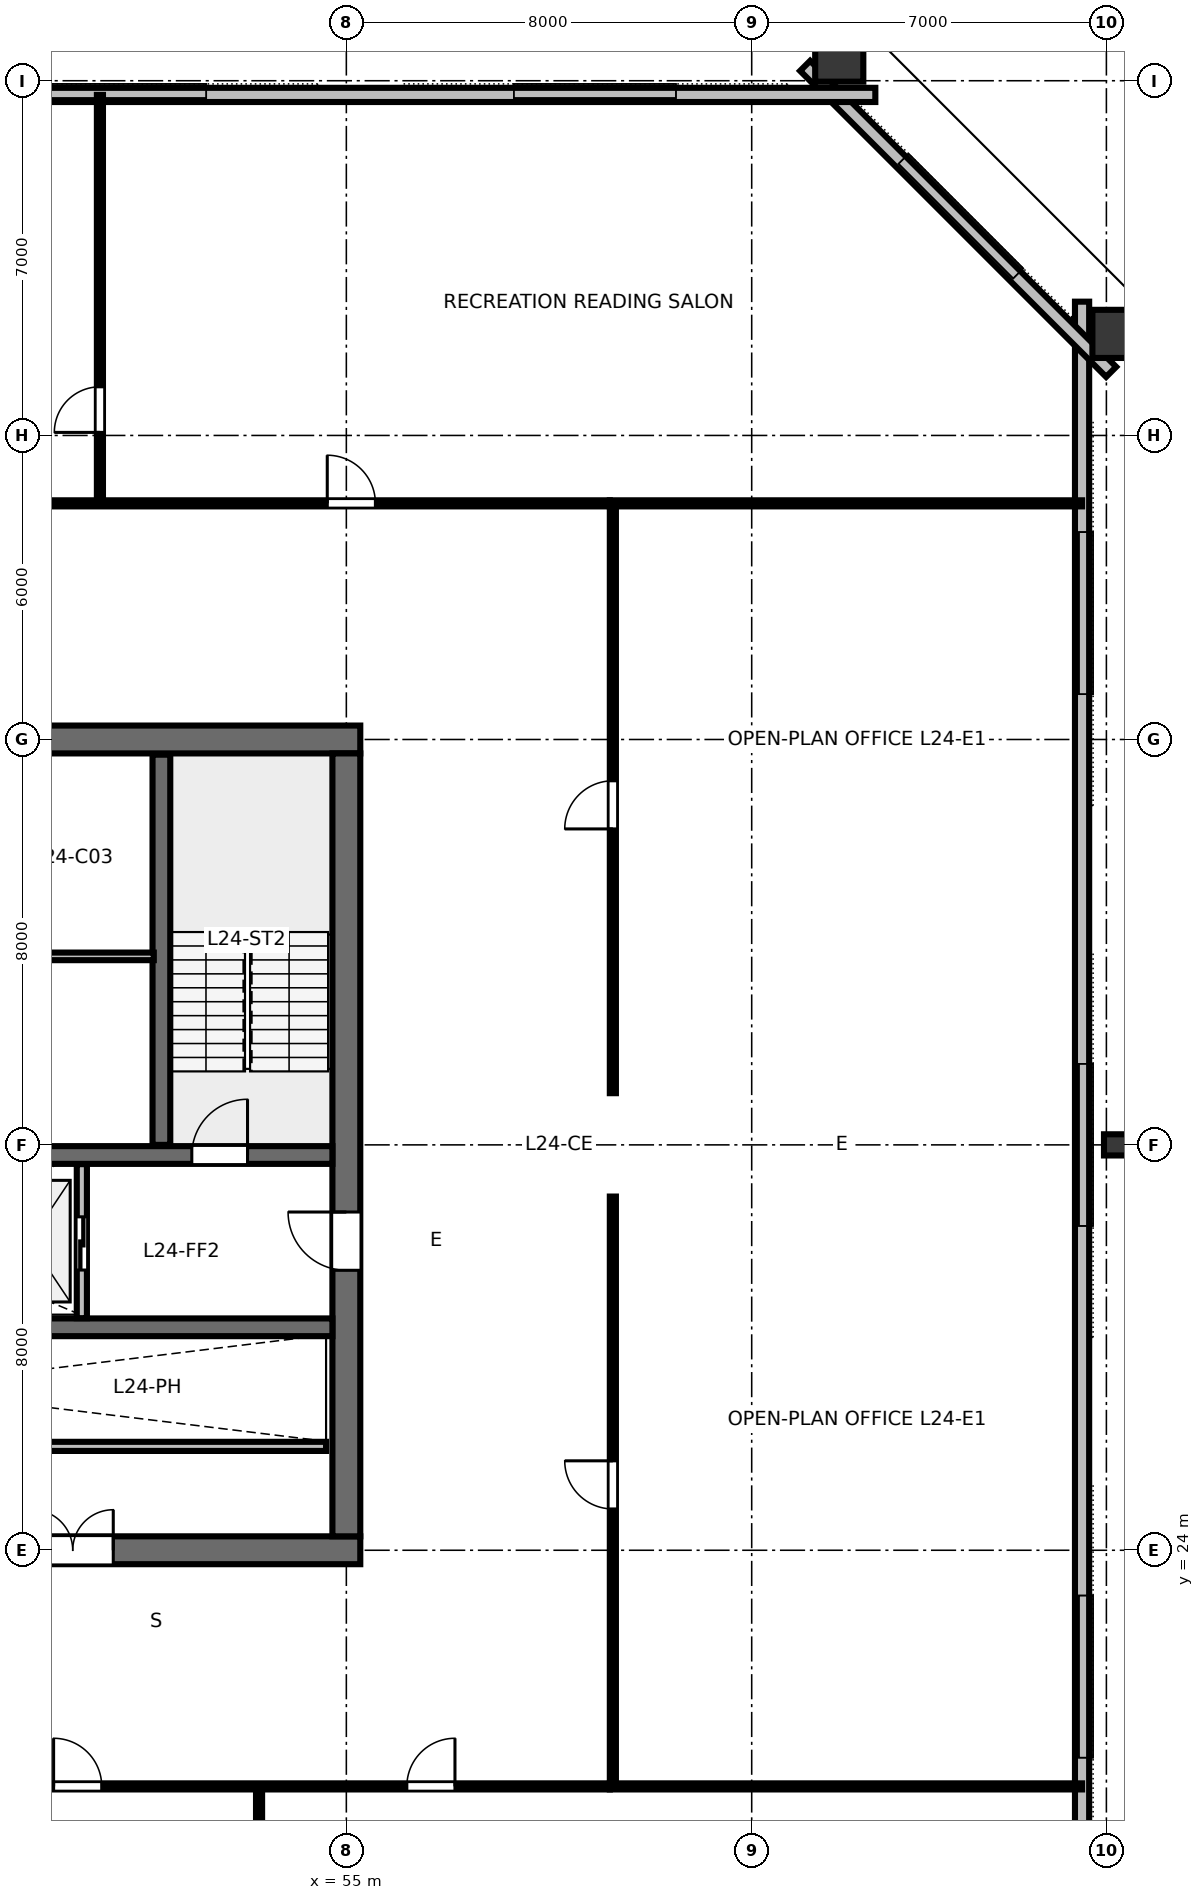
"""IFC4 building model, lengths in metres.
Left out: names, types, materials, properties, quantities, classifications, styles, units other than length and angle.
Written with IfcOpenShell. Run it as: python <this file> out.ifc"""

import sys

from ifc_helpers import new_model, si_unit, direction, frame, frame_2d, origin, origin_2d, place, context, subcontext, project, spatial, rectangle, hollow_rectangle, i_section, extrude, element, fill, save


model = new_model("IFC4")
c1 = context("Model", 3, precision=1e-05, world=origin(), true_north=direction((0.0, 1.0)))
c2 = subcontext(c1, "Body", "Model", "MODEL_VIEW")
j1 = project(units=[si_unit("LENGTHUNIT", "METRE"), si_unit("PLANEANGLEUNIT", "RADIAN")], contexts=[c1])
p1 = place(None, origin())
s1 = spatial("IfcSite", under=j1, at=p1, CompositionType="ELEMENT")
p2 = place(p1, origin())
s2 = spatial("IfcBuilding", under=s1, at=p2, CompositionType="ELEMENT")
p3 = place(p2, frame((0.0, 0.0, 95.2)))
s3 = spatial("IfcBuildingStorey", under=s2, at=p3, CompositionType="ELEMENT", Elevation=95.2)
p4 = place(p3, frame((36.725, 24.0, 0.0), z_axis=(0.0, 0.0, 1.0), x_axis=(1.0, 0.0, 0.0)))
e1 = element("IfcWall", 1, at=p4, inside=s3, PredefinedType="SHEAR", context=c2, shape_type="SweptSolid", body=[
    extrude(rectangle(XDim=18.55, YDim=0.55, at=frame_2d((9.275, 0.0))), origin(), (0.0, 0.0, 1.0), 3.36),
])
p5 = place(p4, frame((5.675, 0.0, 0.0)))
e2 = element("IfcOpeningElement", 2, at=p5, cuts=e1, PredefinedType="OPENING", context=c2, shape_type="SweptSolid", body=[
    extrude(rectangle(XDim=1.6, YDim=2.15, at=frame_2d((0.8, 1.075))), frame((0.0, 0.285, 0.0), z_axis=(0.0, -1.0, 0.0), x_axis=(1.0, 0.0, 0.0)), (0.0, 0.0, 1.0), 0.57),
])
p6 = place(p4, frame((12.075, 0.0, 0.0)))
e3 = element("IfcOpeningElement", 3, at=p6, cuts=e1, PredefinedType="OPENING", context=c2, shape_type="SweptSolid", body=[
    extrude(rectangle(XDim=1.6, YDim=2.15, at=frame_2d((0.8, 1.075))), frame((0.0, 0.285, 0.0), z_axis=(0.0, -1.0, 0.0), x_axis=(1.0, 0.0, 0.0)), (0.0, 0.0, 1.0), 0.57),
])
p7 = place(p3, frame((36.725, 40.0, 0.0), z_axis=(0.0, 0.0, 1.0), x_axis=(1.0, 0.0, 0.0)))
e4 = element("IfcWall", 4, at=p7, inside=s3, PredefinedType="SHEAR", context=c2, shape_type="SweptSolid", body=[
    extrude(rectangle(XDim=18.55, YDim=0.55, at=frame_2d((9.275, 0.0))), origin(), (0.0, 0.0, 1.0), 3.36),
])
p8 = place(p7, frame((8.775, 0.0, 0.0)))
e5 = element("IfcOpeningElement", 5, at=p8, cuts=e4, PredefinedType="OPENING", context=c2, shape_type="SweptSolid", body=[
    extrude(rectangle(XDim=1.0, YDim=2.15, at=frame_2d((0.5, 1.075))), frame((0.0, 0.285, 0.0), z_axis=(0.0, -1.0, 0.0), x_axis=(1.0, 0.0, 0.0)), (0.0, 0.0, 1.0), 0.57),
])
p9 = place(p3, frame((55.0, 24.275, 0.0), z_axis=(0.0, 0.0, 1.0), x_axis=(0.0, 1.0, 0.0)))
e6 = element("IfcWall", 6, at=p9, inside=s3, PredefinedType="SHEAR", context=c2, shape_type="SweptSolid", body=[
    extrude(rectangle(XDim=15.45, YDim=0.55, at=frame_2d((7.725, 0.0))), origin(), (0.0, 0.0, 1.0), 3.36),
])
p10 = place(p9, frame((5.25, 0.0, 0.0)))
e7 = element("IfcOpeningElement", 7, at=p10, cuts=e6, PredefinedType="OPENING", context=c2, shape_type="SweptSolid", body=[
    extrude(rectangle(XDim=1.15, YDim=2.15, at=frame_2d((0.575, 1.075))), frame((0.0, 0.285, 0.0), z_axis=(0.0, -1.0, 0.0), x_axis=(1.0, 0.0, 0.0)), (0.0, 0.0, 1.0), 0.57),
])
p11 = place(p3, frame((37.275, 31.8, 0.0), z_axis=(0.0, 0.0, 1.0), x_axis=(1.0, 0.0, 0.0)))
e8 = element("IfcWall", 8, at=p11, inside=s3, PredefinedType="SHEAR", context=c2, shape_type="SweptSolid", body=[
    extrude(rectangle(XDim=17.45, YDim=0.35, at=frame_2d((8.725, 0.0))), origin(), (0.0, 0.0, 1.0), 3.36),
])
p12 = place(p11, frame((0.775, 0.0, 0.0)))
e9 = element("IfcOpeningElement", 9, at=p12, cuts=e8, PredefinedType="OPENING", context=c2, shape_type="SweptSolid", body=[
    extrude(rectangle(XDim=1.1, YDim=2.15, at=frame_2d((0.55, 1.075))), frame((0.0, 0.185, 0.0), z_axis=(0.0, -1.0, 0.0), x_axis=(1.0, 0.0, 0.0)), (0.0, 0.0, 1.0), 0.37),
])
p13 = place(p11, frame((14.675, 0.0, 0.0)))
e10 = element("IfcOpeningElement", 10, at=p13, cuts=e8, PredefinedType="OPENING", context=c2, shape_type="SweptSolid", body=[
    extrude(rectangle(XDim=1.1, YDim=2.15, at=frame_2d((0.55, 1.075))), frame((0.0, 0.185, 0.0), z_axis=(0.0, -1.0, 0.0), x_axis=(1.0, 0.0, 0.0)), (0.0, 0.0, 1.0), 0.37),
])
p14 = place(p3, frame((37.275, 28.4, 0.0), z_axis=(0.0, 0.0, 1.0), x_axis=(1.0, 0.0, 0.0)))
e11 = element("IfcWall", 11, at=p14, inside=s3, PredefinedType="SHEAR", context=c2, shape_type="SweptSolid", body=[
    extrude(rectangle(XDim=17.45, YDim=0.35, at=frame_2d((8.725, 0.0))), origin(), (0.0, 0.0, 1.0), 3.36),
])
p15 = place(p3, frame((70.18, 32.0, 0.0), z_axis=(0.0, 0.0, 1.0), x_axis=(0.0, 1.0, 0.0)))
e12 = element("IfcColumn", 12, at=p15, inside=s3, PredefinedType="COLUMN", context=c2, shape_type="SweptSolid", body=[
    extrude(i_section(OverallWidth=0.418, OverallDepth=0.455, WebThickness=0.042, FlangeThickness=0.068, FilletRadius=0.025, at=origin_2d()), origin(), (0.0, 0.0, 1.0), 3.358),
])
for number, where, z_axis, x_axis in (
    (13, (70.299, 48.004, 0.0), (0.0, 0.0, 1.0), (0.0, 1.0, 0.0)),
    (14, (64.728, 53.556, 0.0), (0.0, 0.0, 1.0), (1.0, 0.0, 0.0)),
):
    element("IfcColumn", number, at=place(p3, frame(where, z_axis=z_axis, x_axis=x_axis)), inside=s3, PredefinedType="COLUMN", context=c2, shape_type="SweptSolid", body=[
        extrude(hollow_rectangle(XDim=0.95, YDim=1.15, WallThickness=0.06, at=origin_2d()), origin(), (0.0, 0.0, 1.0), 3.358),
    ])
p16 = place(p3, frame((69.52, 15.36, 0.0), z_axis=(0.0, 0.0, 1.0), x_axis=(0.0, 1.0, 0.0)))
e15 = element("IfcWall", 15, at=p16, inside=s3, PredefinedType="STANDARD", context=c2, shape_type="SweptSolid", body=[
    extrude(rectangle(XDim=33.28, YDim=0.28, at=frame_2d((16.64, 0.0))), origin(), (0.0, 0.0, 1.0), 3.36),
])
p17 = place(p3, frame((70.094, 47.254, 0.0), z_axis=(0.0, 0.0, 1.0), x_axis=(-0.707106781187, 0.707106781187, 0.0)))
e16 = element("IfcWall", 16, at=p17, inside=s3, PredefinedType="STANDARD", context=c2, shape_type="SweptSolid", body=[
    extrude(rectangle(XDim=8.541, YDim=0.28, at=frame_2d((4.271, 0.0))), origin(), (0.0, 0.0, 1.0), 3.36),
])
p18 = place(p3, frame((65.44, 52.72, 0.0), z_axis=(0.0, 0.0, 1.0), x_axis=(-1.0, 0.0, 0.0)))
e17 = element("IfcWall", 17, at=p18, inside=s3, PredefinedType="STANDARD", context=c2, shape_type="SweptSolid", body=[
    extrude(rectangle(XDim=38.88, YDim=0.28, at=frame_2d((19.44, 0.0))), origin(), (0.0, 0.0, 1.0), 3.36),
])
p19 = place(p3, frame((51.35, 32.0, 0.0), z_axis=(0.0, 0.0, 1.0), x_axis=(0.0, 1.0, 0.0)))
e18 = element("IfcWall", 18, at=p19, inside=s3, PredefinedType="SHEAR", context=c2, shape_type="SweptSolid", body=[
    extrude(rectangle(XDim=7.7, YDim=0.35, at=frame_2d((3.85, 0.0))), origin(), (0.0, 0.0, 1.0), 3.6),
])
p20 = place(p3, frame((40.8, 35.72, 0.0), z_axis=(0.0, 0.0, 1.0), x_axis=(1.0, 0.0, 0.0)))
e19 = element("IfcWall", 19, at=p20, inside=s3, PredefinedType="PARTITIONING", context=c2, shape_type="SweptSolid", body=[
    extrude(rectangle(XDim=10.4, YDim=0.15, at=frame_2d((5.2, 0.0))), origin(), (0.0, 0.0, 1.0), 3.36),
])
p21 = place(p20, frame((4.9, 0.0, 0.0)))
e20 = element("IfcOpeningElement", 20, at=p21, cuts=e19, PredefinedType="OPENING", context=c2, shape_type="SweptSolid", body=[
    extrude(rectangle(XDim=0.9, YDim=2.15, at=frame_2d((0.45, 1.075))), frame((0.0, 0.085, 0.0), z_axis=(0.0, -1.0, 0.0), x_axis=(1.0, 0.0, 0.0)), (0.0, 0.0, 1.0), 0.17),
])
p22 = place(p3, frame((49.78, 28.58, 0.0), z_axis=(0.0, 0.0, 1.0), x_axis=(0.0, 1.0, 0.0)))
e21 = element("IfcWall", 21, at=p22, inside=s3, PredefinedType="PARTITIONING", context=c2, shape_type="SweptSolid", body=[
    extrude(rectangle(XDim=3.04, YDim=0.2, at=frame_2d((1.52, 0.0))), origin(), (0.0, 0.0, 1.0), 3.36),
])
p23 = place(p22, frame((0.95, 0.0, 0.0)))
e22 = element("IfcOpeningElement", 22, at=p23, cuts=e21, PredefinedType="OPENING", context=c2, shape_type="SweptSolid", body=[
    extrude(rectangle(XDim=1.05, YDim=2.15, at=frame_2d((0.525, 1.075))), frame((0.0, 0.11, 0.0), z_axis=(0.0, -1.0, 0.0), x_axis=(1.0, 0.0, 0.0)), (0.0, 0.0, 1.0), 0.22),
])
p24 = place(p3, frame((37.4, 26.05, 0.0), z_axis=(0.0, 0.0, 1.0), x_axis=(1.0, 0.0, 0.0)))
e23 = element("IfcWall", 23, at=p24, inside=s3, PredefinedType="PARTITIONING", context=c2, shape_type="SweptSolid", body=[
    extrude(rectangle(XDim=17.2, YDim=0.18, at=frame_2d((8.6, 0.0))), origin(), (0.0, 0.0, 1.0), 3.36),
])
p25 = place(p3, frame((53.277, 19.34, 0.0), z_axis=(0.0, 0.0, 1.0), x_axis=(0.0, -1.0, 0.0)))
e24 = element("IfcWall", 24, at=p25, inside=s3, PredefinedType="PARTITIONING", context=c2, shape_type="SweptSolid", body=[
    extrude(rectangle(XDim=8.06, YDim=0.12, at=frame_2d((4.03, 0.0))), origin(), (0.0, 0.0, 1.0), 2.64),
])
p26 = place(p25, frame((1.4, 0.0, 0.0)))
e25 = element("IfcOpeningElement", 25, at=p26, cuts=e24, PredefinedType="OPENING", context=c2, shape_type="SweptSolid", body=[
    extrude(rectangle(XDim=0.9, YDim=2.15, at=frame_2d((0.45, 1.075))), frame((0.0, 0.07, 0.0), z_axis=(0.0, -1.0, 0.0), x_axis=(1.0, 0.0, 0.0)), (0.0, 0.0, 1.0), 0.14),
])
p27 = place(p3, frame((31.8, 19.34, 0.0), z_axis=(0.0, 0.0, 1.0), x_axis=(1.0, 0.0, 0.0)))
e26 = element("IfcWall", 26, at=p27, inside=s3, PredefinedType="PARTITIONING", context=c2, shape_type="SweptSolid", body=[
    extrude(rectangle(XDim=28.4, YDim=0.12, at=frame_2d((14.2, 0.0))), origin(), (0.0, 0.0, 1.0), 2.64),
])
p28 = place(p27, frame((4.201, 0.0, 0.0)))
e27 = element("IfcOpeningElement", 27, at=p28, cuts=e26, PredefinedType="OPENING", context=c2, shape_type="SweptSolid", body=[
    extrude(rectangle(XDim=0.95, YDim=2.15, at=frame_2d((0.475, 1.075))), frame((0.0, 0.07, 0.0), z_axis=(0.0, -1.0, 0.0), x_axis=(1.0, 0.0, 0.0)), (0.0, 0.0, 1.0), 0.14),
])
p29 = place(p27, frame((11.29, 0.0, 0.0)))
e28 = element("IfcOpeningElement", 28, at=p29, cuts=e26, PredefinedType="OPENING", context=c2, shape_type="SweptSolid", body=[
    extrude(rectangle(XDim=0.95, YDim=2.15, at=frame_2d((0.475, 1.075))), frame((0.0, 0.07, 0.0), z_axis=(0.0, -1.0, 0.0), x_axis=(1.0, 0.0, 0.0)), (0.0, 0.0, 1.0), 0.14),
])
p30 = place(p27, frame((17.423, 0.0, 0.0)))
e29 = element("IfcOpeningElement", 29, at=p30, cuts=e26, PredefinedType="OPENING", context=c2, shape_type="SweptSolid", body=[
    extrude(rectangle(XDim=0.95, YDim=2.15, at=frame_2d((0.475, 1.075))), frame((0.0, 0.07, 0.0), z_axis=(0.0, -1.0, 0.0), x_axis=(1.0, 0.0, 0.0)), (0.0, 0.0, 1.0), 0.14),
])
p31 = place(p27, frame((24.394, 0.0, 0.0)))
e30 = element("IfcOpeningElement", 30, at=p31, cuts=e26, PredefinedType="OPENING", context=c2, shape_type="SweptSolid", body=[
    extrude(rectangle(XDim=0.95, YDim=2.15, at=frame_2d((0.475, 1.075))), frame((0.0, 0.07, 0.0), z_axis=(0.0, -1.0, 0.0), x_axis=(1.0, 0.0, 0.0)), (0.0, 0.0, 1.0), 0.14),
])
p32 = place(p3, frame((50.137, 44.66, 0.0), z_axis=(0.0, 0.0, 1.0), x_axis=(0.0, 1.0, 0.0)))
e31 = element("IfcWall", 31, at=p32, inside=s3, PredefinedType="PARTITIONING", context=c2, shape_type="SweptSolid", body=[
    extrude(rectangle(XDim=8.06, YDim=0.12, at=frame_2d((4.03, 0.0))), origin(), (0.0, 0.0, 1.0), 2.64),
])
p33 = place(p32, frame((1.4, 0.0, 0.0)))
e32 = element("IfcOpeningElement", 32, at=p33, cuts=e31, PredefinedType="OPENING", context=c2, shape_type="SweptSolid", body=[
    extrude(rectangle(XDim=0.9, YDim=2.15, at=frame_2d((0.45, 1.075))), frame((0.0, 0.07, 0.0), z_axis=(0.0, -1.0, 0.0), x_axis=(1.0, 0.0, 0.0)), (0.0, 0.0, 1.0), 0.14),
])
p34 = place(p3, frame((31.8, 44.66, 0.0), z_axis=(0.0, 0.0, 1.0), x_axis=(1.0, 0.0, 0.0)))
e33 = element("IfcWall", 33, at=p34, inside=s3, PredefinedType="PARTITIONING", context=c2, shape_type="SweptSolid", body=[
    extrude(rectangle(XDim=28.4, YDim=0.12, at=frame_2d((14.2, 0.0))), origin(), (0.0, 0.0, 1.0), 2.64),
])
p35 = place(p34, frame((3.452, 0.0, 0.0)))
e34 = element("IfcOpeningElement", 34, at=p35, cuts=e33, PredefinedType="OPENING", context=c2, shape_type="SweptSolid", body=[
    extrude(rectangle(XDim=0.95, YDim=2.15, at=frame_2d((0.475, 1.075))), frame((0.0, 0.07, 0.0), z_axis=(0.0, -1.0, 0.0), x_axis=(1.0, 0.0, 0.0)), (0.0, 0.0, 1.0), 0.14),
])
p36 = place(p34, frame((12.551, 0.0, 0.0)))
e35 = element("IfcOpeningElement", 35, at=p36, cuts=e33, PredefinedType="OPENING", context=c2, shape_type="SweptSolid", body=[
    extrude(rectangle(XDim=0.95, YDim=2.15, at=frame_2d((0.475, 1.075))), frame((0.0, 0.07, 0.0), z_axis=(0.0, -1.0, 0.0), x_axis=(1.0, 0.0, 0.0)), (0.0, 0.0, 1.0), 0.14),
])
p37 = place(p34, frame((22.823, 0.0, 0.0)))
e36 = element("IfcOpeningElement", 36, at=p37, cuts=e33, PredefinedType="OPENING", context=c2, shape_type="SweptSolid", body=[
    extrude(rectangle(XDim=0.95, YDim=2.15, at=frame_2d((0.475, 1.075))), frame((0.0, 0.07, 0.0), z_axis=(0.0, -1.0, 0.0), x_axis=(1.0, 0.0, 0.0)), (0.0, 0.0, 1.0), 0.14),
])
p38 = place(p3, frame((60.26, 19.4, 0.0), z_axis=(0.0, 0.0, 1.0), x_axis=(0.0, 1.0, 0.0)))
e37 = element("IfcWall", 37, at=p38, inside=s3, PredefinedType="PARTITIONING", context=c2, shape_type="SweptSolid", body=[
    extrude(rectangle(XDim=11.58, YDim=0.12, at=frame_2d((5.79, 0.0))), origin(), (0.0, 0.0, 1.0), 2.64),
])
p39 = place(p38, frame((5.415, 0.0, 0.0)))
e38 = element("IfcOpeningElement", 38, at=p39, cuts=e37, PredefinedType="OPENING", context=c2, shape_type="SweptSolid", body=[
    extrude(rectangle(XDim=0.95, YDim=2.15, at=frame_2d((0.475, 1.075))), frame((0.0, 0.07, 0.0), z_axis=(0.0, -1.0, 0.0), x_axis=(1.0, 0.0, 0.0)), (0.0, 0.0, 1.0), 0.14),
])
p40 = place(p3, frame((60.26, 33.02, 0.0), z_axis=(0.0, 0.0, 1.0), x_axis=(0.0, 1.0, 0.0)))
e39 = element("IfcWall", 39, at=p40, inside=s3, PredefinedType="PARTITIONING", context=c2, shape_type="SweptSolid", body=[
    extrude(rectangle(XDim=11.58, YDim=0.12, at=frame_2d((5.79, 0.0))), origin(), (0.0, 0.0, 1.0), 2.64),
])
p41 = place(p40, frame((5.215, 0.0, 0.0)))
e40 = element("IfcOpeningElement", 40, at=p41, cuts=e39, PredefinedType="OPENING", context=c2, shape_type="SweptSolid", body=[
    extrude(rectangle(XDim=0.95, YDim=2.15, at=frame_2d((0.475, 1.075))), frame((0.0, 0.07, 0.0), z_axis=(0.0, -1.0, 0.0), x_axis=(1.0, 0.0, 0.0)), (0.0, 0.0, 1.0), 0.14),
])
for number, where, z_axis, x_axis in (
    (41, (60.2, 19.34, 0.0), (0.0, 0.0, 1.0), (1.0, 0.0, 0.0)),
    (42, (60.2, 44.66, 0.0), (0.0, 0.0, 1.0), (1.0, 0.0, 0.0)),
):
    element("IfcWall", number, at=place(p3, frame(where, z_axis=z_axis, x_axis=x_axis)), inside=s3, PredefinedType="PARTITIONING", context=c2, shape_type="SweptSolid", body=[
        extrude(rectangle(XDim=9.32, YDim=0.12, at=frame_2d((4.66, 0.0))), origin(), (0.0, 0.0, 1.0), 2.64),
    ])
p42 = place(p13, origin())
e43 = element("IfcDoor", 43, at=p42, inside=s3, OperationType="SINGLE_SWING_RIGHT", PredefinedType="DOOR", context=c2, shape_type="SweptSolid", body=[
    extrude(rectangle(XDim=1.1, YDim=2.15, at=frame_2d((0.55, 1.075))), frame((0.0, 0.025, 0.0), z_axis=(0.0, -1.0, 0.0), x_axis=(1.0, 0.0, 0.0)), (0.0, 0.0, 1.0), 0.05),
])
fill(e10, e43)
p43 = place(p10, origin())
e44 = element("IfcDoor", 44, at=p43, inside=s3, OperationType="SINGLE_SWING_RIGHT", PredefinedType="DOOR", context=c2, shape_type="SweptSolid", body=[
    extrude(rectangle(XDim=1.15, YDim=2.15, at=frame_2d((0.575, 1.075))), frame((0.0, 0.025, 0.0), z_axis=(0.0, -1.0, 0.0), x_axis=(1.0, 0.0, 0.0)), (0.0, 0.0, 1.0), 0.05),
])
fill(e7, e44)
p44 = place(p6, origin())
e45 = element("IfcDoor", 45, at=p44, inside=s3, OperationType="DOUBLE_DOOR_SINGLE_SWING", PredefinedType="DOOR", context=c2, shape_type="SweptSolid", body=[
    extrude(rectangle(XDim=1.6, YDim=2.15, at=frame_2d((0.8, 1.075))), frame((0.0, 0.025, 0.0), z_axis=(0.0, -1.0, 0.0), x_axis=(1.0, 0.0, 0.0)), (0.0, 0.0, 1.0), 0.05),
])
fill(e3, e45)
p45 = place(p23, origin())
e46 = element("IfcDoor", 46, at=p45, inside=s3, OperationType="SLIDING_TO_RIGHT", PredefinedType="DOOR", context=c2, shape_type="SweptSolid", body=[
    extrude(rectangle(XDim=1.05, YDim=2.15, at=frame_2d((0.525, 1.075))), frame((0.0, 0.025, 0.0), z_axis=(0.0, -1.0, 0.0), x_axis=(1.0, 0.0, 0.0)), (0.0, 0.0, 1.0), 0.05),
])
fill(e22, e46)
p46 = place(p30, origin())
e47 = element("IfcDoor", 47, at=p46, inside=s3, OperationType="SINGLE_SWING_LEFT", PredefinedType="DOOR", context=c2, shape_type="SweptSolid", body=[
    extrude(rectangle(XDim=0.95, YDim=2.15, at=frame_2d((0.475, 1.075))), frame((0.0, 0.025, 0.0), z_axis=(0.0, -1.0, 0.0), x_axis=(1.0, 0.0, 0.0)), (0.0, 0.0, 1.0), 0.05),
])
fill(e29, e47)
p47 = place(p31, origin())
e48 = element("IfcDoor", 48, at=p47, inside=s3, OperationType="SINGLE_SWING_RIGHT", PredefinedType="DOOR", context=c2, shape_type="SweptSolid", body=[
    extrude(rectangle(XDim=0.95, YDim=2.15, at=frame_2d((0.475, 1.075))), frame((0.0, 0.025, 0.0), z_axis=(0.0, -1.0, 0.0), x_axis=(1.0, 0.0, 0.0)), (0.0, 0.0, 1.0), 0.05),
])
fill(e30, e48)
p48 = place(p33, origin())
e49 = element("IfcDoor", 49, at=p48, inside=s3, OperationType="SINGLE_SWING_LEFT", PredefinedType="DOOR", context=c2, shape_type="SweptSolid", body=[
    extrude(rectangle(XDim=0.9, YDim=2.15, at=frame_2d((0.45, 1.075))), frame((0.0, 0.025, 0.0), z_axis=(0.0, -1.0, 0.0), x_axis=(1.0, 0.0, 0.0)), (0.0, 0.0, 1.0), 0.05),
])
fill(e32, e49)
p49 = place(p37, origin())
e50 = element("IfcDoor", 50, at=p49, inside=s3, OperationType="SINGLE_SWING_LEFT", PredefinedType="DOOR", context=c2, shape_type="SweptSolid", body=[
    extrude(rectangle(XDim=0.95, YDim=2.15, at=frame_2d((0.475, 1.075))), frame((0.0, 0.025, 0.0), z_axis=(0.0, -1.0, 0.0), x_axis=(1.0, 0.0, 0.0)), (0.0, 0.0, 1.0), 0.05),
])
fill(e36, e50)
p50 = place(p39, origin())
e51 = element("IfcDoor", 51, at=p50, inside=s3, OperationType="SINGLE_SWING_RIGHT", PredefinedType="DOOR", context=c2, shape_type="SweptSolid", body=[
    extrude(rectangle(XDim=0.95, YDim=2.15, at=frame_2d((0.475, 1.075))), frame((0.0, 0.025, 0.0), z_axis=(0.0, -1.0, 0.0), x_axis=(1.0, 0.0, 0.0)), (0.0, 0.0, 1.0), 0.05),
])
fill(e38, e51)
p51 = place(p41, origin())
e52 = element("IfcDoor", 52, at=p51, inside=s3, OperationType="SINGLE_SWING_LEFT", PredefinedType="DOOR", context=c2, shape_type="SweptSolid", body=[
    extrude(rectangle(XDim=0.95, YDim=2.15, at=frame_2d((0.475, 1.075))), frame((0.0, 0.025, 0.0), z_axis=(0.0, -1.0, 0.0), x_axis=(1.0, 0.0, 0.0)), (0.0, 0.0, 1.0), 0.05),
])
fill(e40, e52)
save(model, sys.argv[1])
